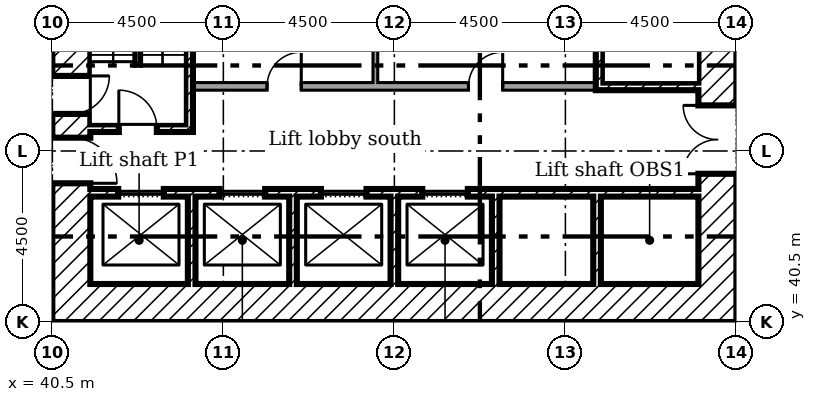
"""IFC4 building model, lengths in metres.
Left out: names, types, materials, properties, quantities, classifications, styles, units other than length and angle.
Written with IfcOpenShell. Run it as: python <this file> out.ifc"""

import sys

from ifc_helpers import new_model, si_unit, direction, frame, frame_2d, origin, place, context, subcontext, project, spatial, rectangle, extrude, element, fill, save


model = new_model("IFC4")
c1 = context("Model", 3, precision=1e-05, world=origin(), true_north=direction((0.0, 1.0)))
c2 = subcontext(c1, "Body", "Model", "MODEL_VIEW")
j1 = project(units=[si_unit("LENGTHUNIT", "METRE"), si_unit("PLANEANGLEUNIT", "RADIAN")], contexts=[c1])
p1 = place(None, origin())
s1 = spatial("IfcSite", under=j1, at=p1, CompositionType="ELEMENT")
p2 = place(p1, origin())
s2 = spatial("IfcBuilding", under=s1, at=p2, CompositionType="ELEMENT")
p3 = place(p2, frame((0.0, 0.0, 6.0)))
s3 = spatial("IfcBuildingStorey", under=s2, at=p3, CompositionType="ELEMENT", Elevation=6.0)
p4 = place(p3, frame((58.0, 40.5, 0.0), z_axis=(0.0, 0.0, 1.0), x_axis=(0.0, 1.0, 0.0)))
e1 = element("IfcWall", 1, at=p4, inside=s3, PredefinedType="SHEAR", context=c2, shape_type="SweptSolid", body=[
    extrude(rectangle(XDim=18.0, YDim=1.0, at=frame_2d((9.0, 0.0))), origin(), (0.0, 0.0, 1.0), 5.0),
])
p5 = place(p4, frame((13.15, 0.0, 0.0)))
e2 = element("IfcOpeningElement", 2, at=p5, cuts=e1, PredefinedType="OPENING", context=c2, shape_type="SweptSolid", body=[
    extrude(rectangle(XDim=1.2, YDim=2.1, at=frame_2d((0.6, 1.05))), frame((0.0, 0.51, 0.0), z_axis=(0.0, -1.0, 0.0), x_axis=(1.0, 0.0, 0.0)), (0.0, 0.0, 1.0), 1.02),
])
p6 = place(p4, frame((3.9, 0.0, 0.0)))
e3 = element("IfcOpeningElement", 3, at=p6, cuts=e1, PredefinedType="OPENING", context=c2, shape_type="SweptSolid", body=[
    extrude(rectangle(XDim=1.8, YDim=2.1, at=frame_2d((0.9, 1.05))), frame((0.0, 0.51, 0.0), z_axis=(0.0, -1.0, 0.0), x_axis=(1.0, 0.0, 0.0)), (0.0, 0.0, 1.0), 1.02),
])
p7 = place(p4, frame((11.525, 0.0, 0.0)))
e4 = element("IfcOpeningElement", 4, at=p7, cuts=e1, PredefinedType="OPENING", context=c2, shape_type="SweptSolid", body=[
    extrude(rectangle(XDim=1.0, YDim=2.1, at=frame_2d((0.5, 1.05))), frame((0.0, 0.51, 0.0), z_axis=(0.0, -1.0, 0.0), x_axis=(1.0, 0.0, 0.0)), (0.0, 0.0, 1.0), 1.02),
])
p8 = place(p3, frame((41.5, 41.0, 0.0)))
e5 = element("IfcWall", 5, at=p8, inside=s3, PredefinedType="SHEAR", context=c2, shape_type="SweptSolid", body=[
    extrude(rectangle(XDim=16.0, YDim=1.0, at=frame_2d((8.0, 0.0))), origin(), (0.0, 0.0, 1.0), 5.0),
])
p9 = place(p3, frame((41.0, 40.5, 0.0), z_axis=(0.0, 0.0, 1.0), x_axis=(0.0, 1.0, 0.0)))
e6 = element("IfcWall", 6, at=p9, inside=s3, PredefinedType="SHEAR", context=c2, shape_type="SweptSolid", body=[
    extrude(rectangle(XDim=18.0, YDim=1.0, at=frame_2d((9.0, 0.0))), origin(), (0.0, 0.0, 1.0), 5.0),
])
p10 = place(p9, frame((3.65, 0.0, 0.0)))
e7 = element("IfcOpeningElement", 7, at=p10, cuts=e6, PredefinedType="OPENING", context=c2, shape_type="SweptSolid", body=[
    extrude(rectangle(XDim=1.2, YDim=2.1, at=frame_2d((0.6, 1.05))), frame((0.0, 0.51, 0.0), z_axis=(0.0, -1.0, 0.0), x_axis=(1.0, 0.0, 0.0)), (0.0, 0.0, 1.0), 1.02),
])
p11 = place(p9, frame((5.475, 0.0, 0.0)))
e8 = element("IfcOpeningElement", 8, at=p11, cuts=e6, PredefinedType="OPENING", context=c2, shape_type="SweptSolid", body=[
    extrude(rectangle(XDim=1.0, YDim=2.1, at=frame_2d((0.5, 1.05))), frame((0.0, 0.51, 0.0), z_axis=(0.0, -1.0, 0.0), x_axis=(1.0, 0.0, 0.0)), (0.0, 0.0, 1.0), 1.02),
])
p12 = place(p9, frame((12.3, 0.0, 0.0)))
e9 = element("IfcOpeningElement", 9, at=p12, cuts=e6, PredefinedType="OPENING", context=c2, shape_type="SweptSolid", body=[
    extrude(rectangle(XDim=1.0, YDim=2.1, at=frame_2d((0.5, 1.05))), frame((0.0, 0.51, 0.0), z_axis=(0.0, -1.0, 0.0), x_axis=(1.0, 0.0, 0.0)), (0.0, 0.0, 1.0), 1.02),
])
for number, where, z_axis, x_axis in (
    (10, (44.167, 41.5, 0.0), (0.0, 0.0, 1.0), (0.0, 1.0, 0.0)),
    (11, (46.833, 41.5, 0.0), (0.0, 0.0, 1.0), (0.0, 1.0, 0.0)),
    (12, (49.5, 41.5, 0.0), (0.0, 0.0, 1.0), (0.0, 1.0, 0.0)),
    (13, (52.167, 41.5, 0.0), (0.0, 0.0, 1.0), (0.0, 1.0, 0.0)),
    (14, (54.833, 41.5, 0.0), (0.0, 0.0, 1.0), (0.0, 1.0, 0.0)),
):
    element("IfcWall", number, at=place(p3, frame(where, z_axis=z_axis, x_axis=x_axis)), inside=s3, PredefinedType="SHEAR", context=c2, shape_type="SweptSolid", body=[
        extrude(rectangle(XDim=2.3, YDim=0.2, at=frame_2d((1.15, 0.0))), origin(), (0.0, 0.0, 1.0), 5.0),
    ])
p13 = place(p3, frame((41.5, 43.9, 0.0)))
e15 = element("IfcWall", 15, at=p13, inside=s3, PredefinedType="SHEAR", context=c2, shape_type="SweptSolid", body=[
    extrude(rectangle(XDim=16.0, YDim=0.2, at=frame_2d((8.0, 0.0))), origin(), (0.0, 0.0, 1.0), 5.0),
])
p14 = place(p13, frame((0.733, 0.0, 0.0)))
e16 = element("IfcOpeningElement", 16, at=p14, cuts=e15, PredefinedType="OPENING", context=c2, shape_type="SweptSolid", body=[
    extrude(rectangle(XDim=1.2, YDim=2.1, at=frame_2d((0.6, 1.05))), frame((0.0, 0.11, 0.0), z_axis=(0.0, -1.0, 0.0), x_axis=(1.0, 0.0, 0.0)), (0.0, 0.0, 1.0), 0.22),
])
p15 = place(p13, frame((3.4, 0.0, 0.0)))
e17 = element("IfcOpeningElement", 17, at=p15, cuts=e15, PredefinedType="OPENING", context=c2, shape_type="SweptSolid", body=[
    extrude(rectangle(XDim=1.2, YDim=2.1, at=frame_2d((0.6, 1.05))), frame((0.0, 0.11, 0.0), z_axis=(0.0, -1.0, 0.0), x_axis=(1.0, 0.0, 0.0)), (0.0, 0.0, 1.0), 0.22),
])
p16 = place(p13, frame((6.067, 0.0, 0.0)))
e18 = element("IfcOpeningElement", 18, at=p16, cuts=e15, PredefinedType="OPENING", context=c2, shape_type="SweptSolid", body=[
    extrude(rectangle(XDim=1.2, YDim=2.1, at=frame_2d((0.6, 1.05))), frame((0.0, 0.11, 0.0), z_axis=(0.0, -1.0, 0.0), x_axis=(1.0, 0.0, 0.0)), (0.0, 0.0, 1.0), 0.22),
])
p17 = place(p13, frame((8.733, 0.0, 0.0)))
e19 = element("IfcOpeningElement", 19, at=p17, cuts=e15, PredefinedType="OPENING", context=c2, shape_type="SweptSolid", body=[
    extrude(rectangle(XDim=1.2, YDim=2.1, at=frame_2d((0.6, 1.05))), frame((0.0, 0.11, 0.0), z_axis=(0.0, -1.0, 0.0), x_axis=(1.0, 0.0, 0.0)), (0.0, 0.0, 1.0), 0.22),
])
p18 = place(p3, frame((44.1, 45.5, 0.0), z_axis=(0.0, 0.0, 1.0), x_axis=(0.0, 1.0, 0.0)))
e20 = element("IfcWall", 20, at=p18, inside=s3, PredefinedType="SHEAR", context=c2, shape_type="SweptSolid", body=[
    extrude(rectangle(XDim=6.9, YDim=0.2, at=frame_2d((3.45, 0.0))), origin(), (0.0, 0.0, 1.0), 5.0),
])
p19 = place(p3, frame((41.5, 45.6, 0.0)))
e21 = element("IfcWall", 21, at=p19, inside=s3, PredefinedType="SHEAR", context=c2, shape_type="SweptSolid", body=[
    extrude(rectangle(XDim=2.5, YDim=0.2, at=frame_2d((1.25, 0.0))), origin(), (0.0, 0.0, 1.0), 5.0),
])
p20 = place(p19, frame((0.75, 0.0, 0.0)))
e22 = element("IfcOpeningElement", 22, at=p20, cuts=e21, PredefinedType="OPENING", context=c2, shape_type="SweptSolid", body=[
    extrude(rectangle(XDim=1.0, YDim=2.1, at=frame_2d((0.5, 1.05))), frame((0.0, 0.11, 0.0), z_axis=(0.0, -1.0, 0.0), x_axis=(1.0, 0.0, 0.0)), (0.0, 0.0, 1.0), 0.22),
])
p21 = place(p3, frame((54.8, 46.7, 0.0)))
e23 = element("IfcWall", 23, at=p21, inside=s3, PredefinedType="SHEAR", context=c2, shape_type="SweptSolid", body=[
    extrude(rectangle(XDim=2.7, YDim=0.2, at=frame_2d((1.35, 0.0))), origin(), (0.0, 0.0, 1.0), 5.0),
])
p22 = place(p3, frame((54.9, 46.8, 0.0), z_axis=(0.0, 0.0, 1.0), x_axis=(0.0, 1.0, 0.0)))
e24 = element("IfcWall", 24, at=p22, inside=s3, PredefinedType="SHEAR", context=c2, shape_type="SweptSolid", body=[
    extrude(rectangle(XDim=6.5, YDim=0.2, at=frame_2d((3.25, 0.0))), origin(), (0.0, 0.0, 1.0), 5.0),
])
p23 = place(p3, frame((44.2, 46.7, 0.0)))
e25 = element("IfcWall", 25, at=p23, inside=s3, PredefinedType="PARTITIONING", context=c2, shape_type="SweptSolid", body=[
    extrude(rectangle(XDim=10.6, YDim=0.2, at=frame_2d((5.3, 0.0))), origin(), (0.0, 0.0, 1.0), 5.0),
])
p24 = place(p23, frame((1.95, 0.0, 0.0)))
e26 = element("IfcOpeningElement", 26, at=p24, cuts=e25, PredefinedType="OPENING", context=c2, shape_type="SweptSolid", body=[
    extrude(rectangle(XDim=0.9, YDim=2.1, at=frame_2d((0.45, 1.05))), frame((0.0, 0.11, 0.0), z_axis=(0.0, -1.0, 0.0), x_axis=(1.0, 0.0, 0.0)), (0.0, 0.0, 1.0), 0.22),
])
p25 = place(p23, frame((7.25, 0.0, 0.0)))
e27 = element("IfcOpeningElement", 27, at=p25, cuts=e25, PredefinedType="OPENING", context=c2, shape_type="SweptSolid", body=[
    extrude(rectangle(XDim=0.9, YDim=2.1, at=frame_2d((0.45, 1.05))), frame((0.0, 0.11, 0.0), z_axis=(0.0, -1.0, 0.0), x_axis=(1.0, 0.0, 0.0)), (0.0, 0.0, 1.0), 0.22),
])
p26 = place(p3, frame((49.0, 46.8, 0.0), z_axis=(0.0, 0.0, 1.0), x_axis=(0.0, 1.0, 0.0)))
e28 = element("IfcWall", 28, at=p26, inside=s3, PredefinedType="PARTITIONING", context=c2, shape_type="SweptSolid", body=[
    extrude(rectangle(XDim=2.363, YDim=0.125, at=frame_2d((1.181, 0.0))), origin(), (0.0, 0.0, 1.0), 5.0),
])
p27 = place(p6, origin())
e29 = element("IfcDoor", 29, at=p27, inside=s3, OperationType="DOUBLE_DOOR_SINGLE_SWING", PredefinedType="DOOR", context=c2, shape_type="SweptSolid", body=[
    extrude(rectangle(XDim=1.8, YDim=2.1, at=frame_2d((0.9, 1.05))), frame((0.0, 0.025, 0.0), z_axis=(0.0, -1.0, 0.0), x_axis=(1.0, 0.0, 0.0)), (0.0, 0.0, 1.0), 0.05),
])
fill(e3, e29)
p28 = place(p10, frame((1.2, 0.0, 0.0), x_axis=(-1.0, 0.0, 0.0)))
e30 = element("IfcDoor", 30, at=p28, inside=s3, OperationType="SINGLE_SWING_LEFT", PredefinedType="DOOR", context=c2, shape_type="SweptSolid", body=[
    extrude(rectangle(XDim=1.2, YDim=2.1, at=frame_2d((0.6, 1.05))), frame((0.0, 0.025, 0.0), z_axis=(0.0, -1.0, 0.0), x_axis=(1.0, 0.0, 0.0)), (0.0, 0.0, 1.0), 0.05),
])
fill(e7, e30)
p29 = place(p20, origin())
e31 = element("IfcDoor", 31, at=p29, inside=s3, OperationType="SINGLE_SWING_RIGHT", PredefinedType="DOOR", context=c2, shape_type="SweptSolid", body=[
    extrude(rectangle(XDim=1.0, YDim=2.1, at=frame_2d((0.5, 1.05))), frame((0.0, 0.025, 0.0), z_axis=(0.0, -1.0, 0.0), x_axis=(1.0, 0.0, 0.0)), (0.0, 0.0, 1.0), 0.05),
])
fill(e22, e31)
p30 = place(p11, frame((1.0, 0.0, 0.0), x_axis=(-1.0, 0.0, 0.0)))
e32 = element("IfcDoor", 32, at=p30, inside=s3, OperationType="SINGLE_SWING_RIGHT", PredefinedType="DOOR", context=c2, shape_type="SweptSolid", body=[
    extrude(rectangle(XDim=1.0, YDim=2.1, at=frame_2d((0.5, 1.05))), frame((0.0, 0.025, 0.0), z_axis=(0.0, -1.0, 0.0), x_axis=(1.0, 0.0, 0.0)), (0.0, 0.0, 1.0), 0.05),
])
fill(e8, e32)
p31 = place(p24, origin())
e33 = element("IfcDoor", 33, at=p31, inside=s3, OperationType="SINGLE_SWING_LEFT", PredefinedType="DOOR", context=c2, shape_type="SweptSolid", body=[
    extrude(rectangle(XDim=0.9, YDim=2.1, at=frame_2d((0.45, 1.05))), frame((0.0, 0.025, 0.0), z_axis=(0.0, -1.0, 0.0), x_axis=(1.0, 0.0, 0.0)), (0.0, 0.0, 1.0), 0.05),
])
fill(e26, e33)
p32 = place(p25, origin())
e34 = element("IfcDoor", 34, at=p32, inside=s3, OperationType="SINGLE_SWING_LEFT", PredefinedType="DOOR", context=c2, shape_type="SweptSolid", body=[
    extrude(rectangle(XDim=0.9, YDim=2.1, at=frame_2d((0.45, 1.05))), frame((0.0, 0.025, 0.0), z_axis=(0.0, -1.0, 0.0), x_axis=(1.0, 0.0, 0.0)), (0.0, 0.0, 1.0), 0.05),
])
fill(e27, e34)
p33 = place(p14, origin())
e35 = element("IfcDoor", 35, at=p33, inside=s3, OperationType="SLIDING_TO_LEFT", PredefinedType="DOOR", context=c2, shape_type="SweptSolid", body=[
    extrude(rectangle(XDim=1.2, YDim=2.1, at=frame_2d((0.6, 1.05))), frame((0.0, 0.025, 0.0), z_axis=(0.0, -1.0, 0.0), x_axis=(1.0, 0.0, 0.0)), (0.0, 0.0, 1.0), 0.05),
])
fill(e16, e35)
p34 = place(p15, origin())
e36 = element("IfcDoor", 36, at=p34, inside=s3, OperationType="SLIDING_TO_LEFT", PredefinedType="DOOR", context=c2, shape_type="SweptSolid", body=[
    extrude(rectangle(XDim=1.2, YDim=2.1, at=frame_2d((0.6, 1.05))), frame((0.0, 0.025, 0.0), z_axis=(0.0, -1.0, 0.0), x_axis=(1.0, 0.0, 0.0)), (0.0, 0.0, 1.0), 0.05),
])
fill(e17, e36)
p35 = place(p16, origin())
e37 = element("IfcDoor", 37, at=p35, inside=s3, OperationType="SLIDING_TO_LEFT", PredefinedType="DOOR", context=c2, shape_type="SweptSolid", body=[
    extrude(rectangle(XDim=1.2, YDim=2.1, at=frame_2d((0.6, 1.05))), frame((0.0, 0.025, 0.0), z_axis=(0.0, -1.0, 0.0), x_axis=(1.0, 0.0, 0.0)), (0.0, 0.0, 1.0), 0.05),
])
fill(e18, e37)
p36 = place(p17, origin())
e38 = element("IfcDoor", 38, at=p36, inside=s3, OperationType="SLIDING_TO_LEFT", PredefinedType="DOOR", context=c2, shape_type="SweptSolid", body=[
    extrude(rectangle(XDim=1.2, YDim=2.1, at=frame_2d((0.6, 1.05))), frame((0.0, 0.025, 0.0), z_axis=(0.0, -1.0, 0.0), x_axis=(1.0, 0.0, 0.0)), (0.0, 0.0, 1.0), 0.05),
])
fill(e19, e38)
save(model, sys.argv[1])
